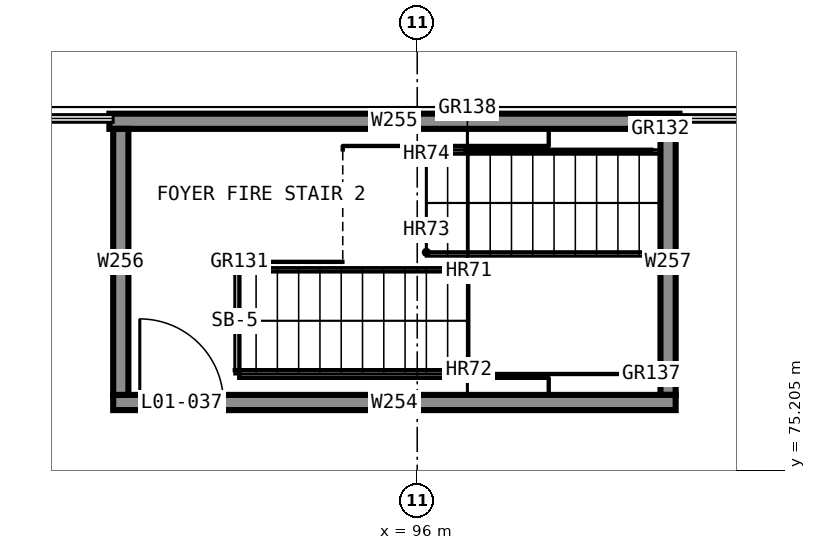
"""IFC4 building model, lengths in metres.
Left out: names, types, materials, properties, quantities, classifications, styles, units other than length and angle.
Written with IfcOpenShell. Run it as: python <this file> out.ifc"""

import sys

from ifc_helpers import new_model, si_unit, direction, frame, frame_2d, origin, place, context, subcontext, project, spatial, rectangle, extrude, element, fill, save


model = new_model("IFC4")
c1 = context("Model", 3, precision=1e-05, world=origin(), true_north=direction((0.0, 1.0)))
c2 = subcontext(c1, "Body", "Model", "MODEL_VIEW")
j1 = project(units=[si_unit("LENGTHUNIT", "METRE"), si_unit("PLANEANGLEUNIT", "RADIAN")], contexts=[c1])
p1 = place(None, origin())
s1 = spatial("IfcSite", under=j1, at=p1, CompositionType="ELEMENT")
p2 = place(p1, origin())
s2 = spatial("IfcBuilding", under=s1, at=p2, CompositionType="ELEMENT")
p3 = place(p2, frame((0.0, 0.0, 5.5)))
s3 = spatial("IfcBuildingStorey", under=s2, at=p3, CompositionType="ELEMENT", Elevation=5.5)
p4 = place(p3, frame((92.0, 76.1, 0.0), z_axis=(0.0, 0.0, 1.0), x_axis=(1.0, 0.0, 0.0)))
e1 = element("IfcWall", 1, at=p4, inside=s3, PredefinedType="SHEAR", context=c2, shape_type="SweptSolid", body=[
    extrude(rectangle(XDim=7.4, YDim=0.2, at=frame_2d((3.7, 0.0))), origin(), (0.0, 0.0, 1.0), 4.0),
])
p5 = place(p4, frame((0.35, 0.0, 0.0)))
e2 = element("IfcOpeningElement", 2, at=p5, cuts=e1, PredefinedType="OPENING", context=c2, shape_type="SweptSolid", body=[
    extrude(rectangle(XDim=1.1, YDim=2.1, at=frame_2d((0.55, 1.05))), frame((0.0, 0.11, 0.0), z_axis=(0.0, -1.0, 0.0), x_axis=(1.0, 0.0, 0.0)), (0.0, 0.0, 1.0), 0.22),
])
p6 = place(p3, frame((99.45, 79.8, 0.0), z_axis=(0.0, 0.0, 1.0), x_axis=(-1.0, 0.0, 0.0)))
e3 = element("IfcWall", 3, at=p6, inside=s3, PredefinedType="SHEAR", context=c2, shape_type="SweptSolid", body=[
    extrude(rectangle(XDim=7.5, YDim=0.2, at=frame_2d((3.75, 0.0))), origin(), (0.0, 0.0, 1.0), 4.0),
])
for number, where, z_axis, x_axis in (
    (4, (92.1, 79.7, 0.0), (0.0, 0.0, 1.0), (0.0, -1.0, 0.0)),
    (5, (99.3, 76.2, 0.0), (0.0, 0.0, 1.0), (0.0, 1.0, 0.0)),
):
    element("IfcWall", number, at=place(p3, frame(where, z_axis=z_axis, x_axis=x_axis)), inside=s3, PredefinedType="SHEAR", context=c2, shape_type="SweptSolid", body=[
        extrude(rectangle(XDim=3.5, YDim=0.2, at=frame_2d((1.75, 0.0))), origin(), (0.0, 0.0, 1.0), 4.0),
    ])
p7 = place(p5, origin())
e6 = element("IfcDoor", 6, at=p7, inside=s3, OperationType="SINGLE_SWING_RIGHT", PredefinedType="DOOR", context=c2, shape_type="SweptSolid", body=[
    extrude(rectangle(XDim=1.1, YDim=2.1, at=frame_2d((0.55, 1.05))), frame((0.0, 0.025, 0.0), z_axis=(0.0, -1.0, 0.0), x_axis=(1.0, 0.0, 0.0)), (0.0, 0.0, 1.0), 0.05),
])
fill(e2, e6)
save(model, sys.argv[1])
